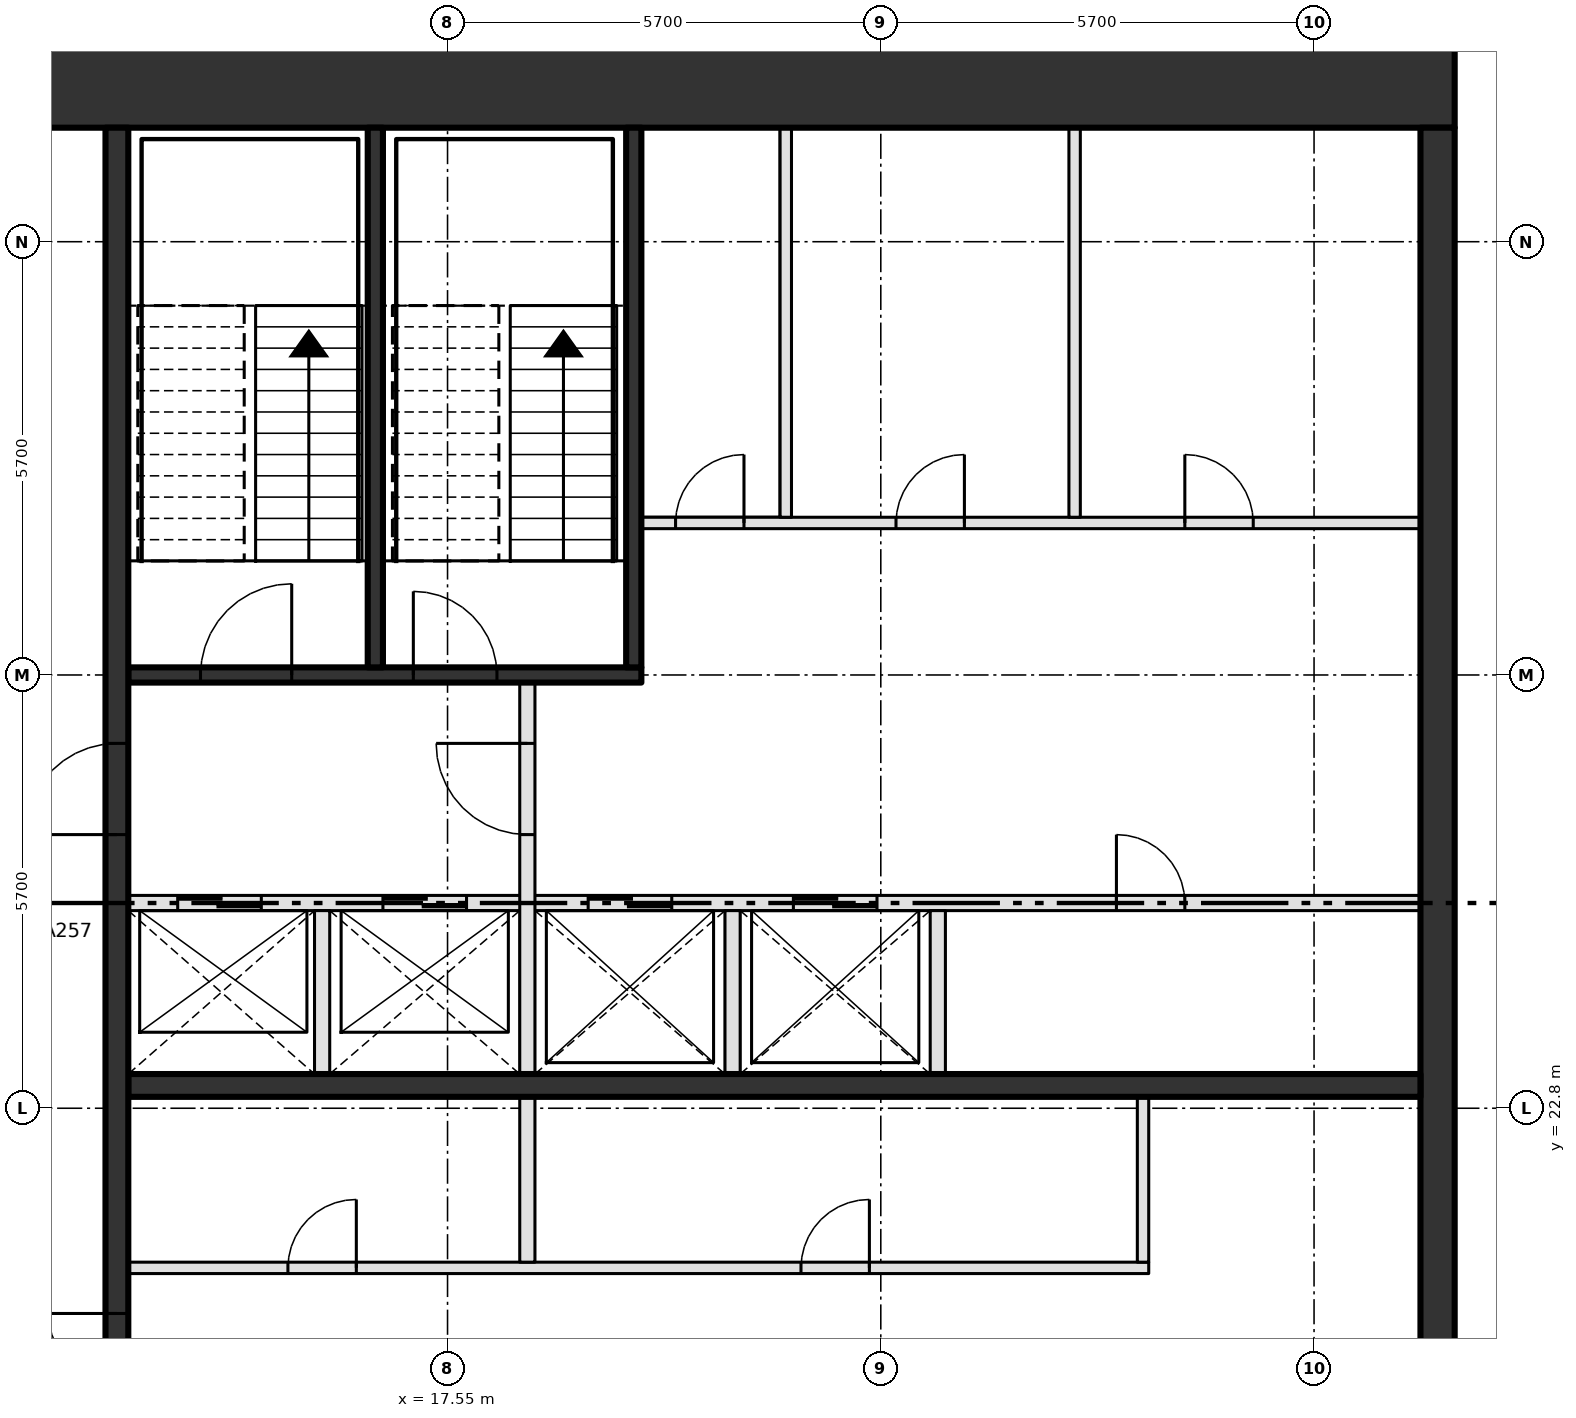
"""IFC4 building model, lengths in metres.
Left out: names, types, materials, properties, quantities, classifications, styles, units other than length and angle.
Written with IfcOpenShell. Run it as: python <this file> out.ifc"""

import sys

from ifc_helpers import new_model, si_unit, direction, frame, frame_2d, origin, place, context, subcontext, project, spatial, rectangle, extrude, element, fill, save


model = new_model("IFC4")
c1 = context("Model", 3, precision=1e-05, world=origin(), true_north=direction((0.0, 1.0)))
c2 = subcontext(c1, "Body", "Model", "MODEL_VIEW")
j1 = project(units=[si_unit("LENGTHUNIT", "METRE"), si_unit("PLANEANGLEUNIT", "RADIAN")], contexts=[c1])
p1 = place(None, origin())
s1 = spatial("IfcSite", under=j1, at=p1, CompositionType="ELEMENT")
p2 = place(p1, origin())
s2 = spatial("IfcBuilding", under=s1, at=p2, CompositionType="ELEMENT")
p3 = place(p2, frame((0.0, 0.0, 414.6)))
s3 = spatial("IfcBuildingStorey", under=s2, at=p3, CompositionType="ELEMENT", Elevation=414.6)
p4 = place(p3, frame((8.0, 36.3, -0.3), z_axis=(0.0, 0.0, 1.0), x_axis=(1.0, 0.0, 0.0)))
e1 = element("IfcWall", 1, at=p4, inside=s3, PredefinedType="SHEAR", context=c2, shape_type="SweptSolid", body=[
    extrude(rectangle(XDim=22.8, YDim=1.2, at=frame_2d((11.4, 0.0))), origin(), (0.0, 0.0, 1.0), 4.65),
])
p5 = place(p4, frame((2.3, 0.0, 0.3)))
e2 = element("IfcOpeningElement", 2, at=p5, cuts=e1, PredefinedType="OPENING", context=c2, shape_type="SweptSolid", body=[
    extrude(rectangle(XDim=1.8, YDim=2.1, at=frame_2d((0.9, 1.05))), frame((0.0, 0.61, 0.0), z_axis=(0.0, -1.0, 0.0), x_axis=(1.0, 0.0, 0.0)), (0.0, 0.0, 1.0), 1.22),
])
p6 = place(p3, frame((30.575, 14.55, -0.3), z_axis=(0.0, 0.0, 1.0), x_axis=(0.0, 1.0, 0.0)))
e3 = element("IfcWall", 3, at=p6, inside=s3, PredefinedType="SHEAR", context=c2, shape_type="SweptSolid", body=[
    extrude(rectangle(XDim=21.15, YDim=0.45, at=frame_2d((10.575, 0.0))), origin(), (0.0, 0.0, 1.0), 4.65),
])
p7 = place(p3, frame((13.35, 20.7, 0.0), z_axis=(0.0, 0.0, 1.0), x_axis=(1.0, 0.0, 0.0)))
e4 = element("IfcWall", 4, at=p7, inside=s3, PredefinedType="PARTITIONING", context=c2, shape_type="SweptSolid", body=[
    extrude(rectangle(XDim=13.425, YDim=0.15, at=frame_2d((6.712, 0.0))), origin(), (0.0, 0.0, 1.0), 4.35),
])
p8 = place(p7, frame((2.1, 0.0, 0.0)))
e5 = element("IfcOpeningElement", 5, at=p8, cuts=e4, PredefinedType="OPENING", context=c2, shape_type="SweptSolid", body=[
    extrude(rectangle(XDim=0.9, YDim=2.1, at=frame_2d((0.45, 1.05))), frame((0.0, 0.085, 0.0), z_axis=(0.0, -1.0, 0.0), x_axis=(1.0, 0.0, 0.0)), (0.0, 0.0, 1.0), 0.17),
])
p9 = place(p7, frame((8.85, 0.0, 0.0)))
e6 = element("IfcOpeningElement", 6, at=p9, cuts=e4, PredefinedType="OPENING", context=c2, shape_type="SweptSolid", body=[
    extrude(rectangle(XDim=0.9, YDim=2.1, at=frame_2d((0.45, 1.05))), frame((0.0, 0.085, 0.0), z_axis=(0.0, -1.0, 0.0), x_axis=(1.0, 0.0, 0.0)), (0.0, 0.0, 1.0), 0.17),
])
p10 = place(p3, frame((13.35, 23.1, 0.0), z_axis=(0.0, 0.0, 1.0), x_axis=(1.0, 0.0, 0.0)))
e7 = element("IfcWall", 7, at=p10, inside=s3, PredefinedType="SHEAR", context=c2, shape_type="SweptSolid", body=[
    extrude(rectangle(XDim=17.0, YDim=0.3, at=frame_2d((8.5, 0.0))), origin(), (0.0, 0.0, 1.0), 4.35),
])
p11 = place(p3, frame((13.35, 25.5, 0.0), z_axis=(0.0, 0.0, 1.0), x_axis=(1.0, 0.0, 0.0)))
e8 = element("IfcWall", 8, at=p11, inside=s3, PredefinedType="SOLIDWALL", context=c2, shape_type="SweptSolid", body=[
    extrude(rectangle(XDim=17.0, YDim=0.2, at=frame_2d((8.5, 0.0))), origin(), (0.0, 0.0, 1.0), 4.35),
])
p12 = place(p11, frame((0.65, 0.0, 0.0)))
e9 = element("IfcOpeningElement", 9, at=p12, cuts=e8, PredefinedType="OPENING", context=c2, shape_type="SweptSolid", body=[
    extrude(rectangle(XDim=1.1, YDim=2.1, at=frame_2d((0.55, 1.05))), frame((0.0, 0.11, 0.0), z_axis=(0.0, -1.0, 0.0), x_axis=(1.0, 0.0, 0.0)), (0.0, 0.0, 1.0), 0.22),
])
p13 = place(p11, frame((3.35, 0.0, 0.0)))
e10 = element("IfcOpeningElement", 10, at=p13, cuts=e8, PredefinedType="OPENING", context=c2, shape_type="SweptSolid", body=[
    extrude(rectangle(XDim=1.1, YDim=2.1, at=frame_2d((0.55, 1.05))), frame((0.0, 0.11, 0.0), z_axis=(0.0, -1.0, 0.0), x_axis=(1.0, 0.0, 0.0)), (0.0, 0.0, 1.0), 0.22),
])
p14 = place(p11, frame((6.05, 0.0, 0.0)))
e11 = element("IfcOpeningElement", 11, at=p14, cuts=e8, PredefinedType="OPENING", context=c2, shape_type="SweptSolid", body=[
    extrude(rectangle(XDim=1.1, YDim=2.1, at=frame_2d((0.55, 1.05))), frame((0.0, 0.11, 0.0), z_axis=(0.0, -1.0, 0.0), x_axis=(1.0, 0.0, 0.0)), (0.0, 0.0, 1.0), 0.22),
])
p15 = place(p11, frame((8.75, 0.0, 0.0)))
e12 = element("IfcOpeningElement", 12, at=p15, cuts=e8, PredefinedType="OPENING", context=c2, shape_type="SweptSolid", body=[
    extrude(rectangle(XDim=1.1, YDim=2.1, at=frame_2d((0.55, 1.05))), frame((0.0, 0.11, 0.0), z_axis=(0.0, -1.0, 0.0), x_axis=(1.0, 0.0, 0.0)), (0.0, 0.0, 1.0), 0.22),
])
p16 = place(p11, frame((13.0, 0.0, 0.0)))
e13 = element("IfcOpeningElement", 13, at=p16, cuts=e8, PredefinedType="OPENING", context=c2, shape_type="SweptSolid", body=[
    extrude(rectangle(XDim=0.9, YDim=2.1, at=frame_2d((0.45, 1.05))), frame((0.0, 0.11, 0.0), z_axis=(0.0, -1.0, 0.0), x_axis=(1.0, 0.0, 0.0)), (0.0, 0.0, 1.0), 0.22),
])
p17 = place(p3, frame((13.35, 28.5, 0.0), z_axis=(0.0, 0.0, 1.0), x_axis=(1.0, 0.0, 0.0)))
e14 = element("IfcWall", 14, at=p17, inside=s3, PredefinedType="SOLIDWALL", context=c2, shape_type="SweptSolid", body=[
    extrude(rectangle(XDim=6.75, YDim=0.2, at=frame_2d((3.375, 0.0))), origin(), (0.0, 0.0, 1.0), 4.35),
])
p18 = place(p17, frame((0.95, 0.0, 0.0)))
e15 = element("IfcOpeningElement", 15, at=p18, cuts=e14, PredefinedType="OPENING", context=c2, shape_type="SweptSolid", body=[
    extrude(rectangle(XDim=1.2, YDim=2.1, at=frame_2d((0.6, 1.05))), frame((0.0, 0.11, 0.0), z_axis=(0.0, -1.0, 0.0), x_axis=(1.0, 0.0, 0.0)), (0.0, 0.0, 1.0), 0.22),
])
p19 = place(p17, frame((3.75, 0.0, 0.0)))
e16 = element("IfcOpeningElement", 16, at=p19, cuts=e14, PredefinedType="OPENING", context=c2, shape_type="SweptSolid", body=[
    extrude(rectangle(XDim=1.1, YDim=2.1, at=frame_2d((0.55, 1.05))), frame((0.0, 0.11, 0.0), z_axis=(0.0, -1.0, 0.0), x_axis=(1.0, 0.0, 0.0)), (0.0, 0.0, 1.0), 0.22),
])
p20 = place(p3, frame((20.1, 30.5, 0.0), z_axis=(0.0, 0.0, 1.0), x_axis=(1.0, 0.0, 0.0)))
e17 = element("IfcWall", 17, at=p20, inside=s3, PredefinedType="PARTITIONING", context=c2, shape_type="SweptSolid", body=[
    extrude(rectangle(XDim=10.25, YDim=0.15, at=frame_2d((5.125, 0.0))), origin(), (0.0, 0.0, 1.0), 4.35),
])
p21 = place(p20, frame((0.45, 0.0, 0.0)))
e18 = element("IfcOpeningElement", 18, at=p21, cuts=e17, PredefinedType="OPENING", context=c2, shape_type="SweptSolid", body=[
    extrude(rectangle(XDim=0.9, YDim=2.1, at=frame_2d((0.45, 1.05))), frame((0.0, 0.085, 0.0), z_axis=(0.0, -1.0, 0.0), x_axis=(1.0, 0.0, 0.0)), (0.0, 0.0, 1.0), 0.17),
])
p22 = place(p20, frame((3.35, 0.0, 0.0)))
e19 = element("IfcOpeningElement", 19, at=p22, cuts=e17, PredefinedType="OPENING", context=c2, shape_type="SweptSolid", body=[
    extrude(rectangle(XDim=0.9, YDim=2.1, at=frame_2d((0.45, 1.05))), frame((0.0, 0.085, 0.0), z_axis=(0.0, -1.0, 0.0), x_axis=(1.0, 0.0, 0.0)), (0.0, 0.0, 1.0), 0.17),
])
p23 = place(p20, frame((7.15, 0.0, 0.0)))
e20 = element("IfcOpeningElement", 20, at=p23, cuts=e17, PredefinedType="OPENING", context=c2, shape_type="SweptSolid", body=[
    extrude(rectangle(XDim=0.9, YDim=2.1, at=frame_2d((0.45, 1.05))), frame((0.0, 0.085, 0.0), z_axis=(0.0, -1.0, 0.0), x_axis=(1.0, 0.0, 0.0)), (0.0, 0.0, 1.0), 0.17),
])
p24 = place(p3, frame((13.2, 14.55, 0.0), z_axis=(0.0, 0.0, 1.0), x_axis=(0.0, 1.0, 0.0)))
e21 = element("IfcWall", 21, at=p24, inside=s3, PredefinedType="SHEAR", context=c2, shape_type="SweptSolid", body=[
    extrude(rectangle(XDim=21.15, YDim=0.3, at=frame_2d((10.575, 0.0))), origin(), (0.0, 0.0, 1.0), 4.35),
])
p25 = place(p24, frame((3.75, 0.0, 0.0)))
e22 = element("IfcOpeningElement", 22, at=p25, cuts=e21, PredefinedType="OPENING", context=c2, shape_type="SweptSolid", body=[
    extrude(rectangle(XDim=1.8, YDim=2.1, at=frame_2d((0.9, 1.05))), frame((0.0, 0.16, 0.0), z_axis=(0.0, -1.0, 0.0), x_axis=(1.0, 0.0, 0.0)), (0.0, 0.0, 1.0), 0.32),
])
p26 = place(p24, frame((11.85, 0.0, 0.0)))
e23 = element("IfcOpeningElement", 23, at=p26, cuts=e21, PredefinedType="OPENING", context=c2, shape_type="SweptSolid", body=[
    extrude(rectangle(XDim=1.2, YDim=2.1, at=frame_2d((0.6, 1.05))), frame((0.0, 0.16, 0.0), z_axis=(0.0, -1.0, 0.0), x_axis=(1.0, 0.0, 0.0)), (0.0, 0.0, 1.0), 0.32),
])
p27 = place(p3, frame((15.9, 23.25, 0.0), z_axis=(0.0, 0.0, 1.0), x_axis=(0.0, 1.0, 0.0)))
e24 = element("IfcWall", 24, at=p27, inside=s3, PredefinedType="SOLIDWALL", context=c2, shape_type="SweptSolid", body=[
    extrude(rectangle(XDim=2.15, YDim=0.2, at=frame_2d((1.075, 0.0))), origin(), (0.0, 0.0, 1.0), 4.35),
])
p28 = place(p3, frame((16.6, 28.6, 0.0), z_axis=(0.0, 0.0, 1.0), x_axis=(0.0, 1.0, 0.0)))
e25 = element("IfcWall", 25, at=p28, inside=s3, PredefinedType="SOLIDWALL", context=c2, shape_type="SweptSolid", body=[
    extrude(rectangle(XDim=7.1, YDim=0.2, at=frame_2d((3.55, 0.0))), origin(), (0.0, 0.0, 1.0), 4.35),
])
p29 = place(p3, frame((18.6, 20.775, 0.0), z_axis=(0.0, 0.0, 1.0), x_axis=(0.0, 1.0, 0.0)))
e26 = element("IfcWall", 26, at=p29, inside=s3, PredefinedType="SOLIDWALL", context=c2, shape_type="SweptSolid", body=[
    extrude(rectangle(XDim=7.625, YDim=0.2, at=frame_2d((3.812, 0.0))), origin(), (0.0, 0.0, 1.0), 4.35),
])
p30 = place(p29, frame((5.625, 0.0, 0.0)))
e27 = element("IfcOpeningElement", 27, at=p30, cuts=e26, PredefinedType="OPENING", context=c2, shape_type="SweptSolid", body=[
    extrude(rectangle(XDim=1.2, YDim=2.1, at=frame_2d((0.6, 1.05))), frame((0.0, 0.11, 0.0), z_axis=(0.0, -1.0, 0.0), x_axis=(1.0, 0.0, 0.0)), (0.0, 0.0, 1.0), 0.22),
])
p31 = place(p3, frame((20.0, 28.6, 0.0), z_axis=(0.0, 0.0, 1.0), x_axis=(0.0, 1.0, 0.0)))
e28 = element("IfcWall", 28, at=p31, inside=s3, PredefinedType="SOLIDWALL", context=c2, shape_type="SweptSolid", body=[
    extrude(rectangle(XDim=7.1, YDim=0.2, at=frame_2d((3.55, 0.0))), origin(), (0.0, 0.0, 1.0), 4.35),
])
p32 = place(p3, frame((21.3, 23.25, 0.0), z_axis=(0.0, 0.0, 1.0), x_axis=(0.0, 1.0, 0.0)))
e29 = element("IfcWall", 29, at=p32, inside=s3, PredefinedType="SOLIDWALL", context=c2, shape_type="SweptSolid", body=[
    extrude(rectangle(XDim=2.15, YDim=0.2, at=frame_2d((1.075, 0.0))), origin(), (0.0, 0.0, 1.0), 4.35),
])
p33 = place(p3, frame((22.0, 30.575, 0.0), z_axis=(0.0, 0.0, 1.0), x_axis=(0.0, 1.0, 0.0)))
e30 = element("IfcWall", 30, at=p33, inside=s3, PredefinedType="PARTITIONING", context=c2, shape_type="SweptSolid", body=[
    extrude(rectangle(XDim=5.125, YDim=0.15, at=frame_2d((2.562, 0.0))), origin(), (0.0, 0.0, 1.0), 4.35),
])
p34 = place(p3, frame((24.0, 23.25, 0.0), z_axis=(0.0, 0.0, 1.0), x_axis=(0.0, 1.0, 0.0)))
e31 = element("IfcWall", 31, at=p34, inside=s3, PredefinedType="SOLIDWALL", context=c2, shape_type="SweptSolid", body=[
    extrude(rectangle(XDim=2.15, YDim=0.2, at=frame_2d((1.075, 0.0))), origin(), (0.0, 0.0, 1.0), 4.35),
])
p35 = place(p3, frame((25.8, 30.575, 0.0), z_axis=(0.0, 0.0, 1.0), x_axis=(0.0, 1.0, 0.0)))
e32 = element("IfcWall", 32, at=p35, inside=s3, PredefinedType="PARTITIONING", context=c2, shape_type="SweptSolid", body=[
    extrude(rectangle(XDim=5.125, YDim=0.15, at=frame_2d((2.562, 0.0))), origin(), (0.0, 0.0, 1.0), 4.35),
])
p36 = place(p3, frame((26.7, 20.775, 0.0), z_axis=(0.0, 0.0, 1.0), x_axis=(0.0, 1.0, 0.0)))
e33 = element("IfcWall", 33, at=p36, inside=s3, PredefinedType="PARTITIONING", context=c2, shape_type="SweptSolid", body=[
    extrude(rectangle(XDim=2.175, YDim=0.15, at=frame_2d((1.087, 0.0))), origin(), (0.0, 0.0, 1.0), 4.35),
])
p37 = place(p12, origin())
e34 = element("IfcDoor", 34, at=p37, inside=s3, OperationType="SLIDING_TO_LEFT", PredefinedType="DOOR", context=c2, shape_type="SweptSolid", body=[
    extrude(rectangle(XDim=1.1, YDim=2.1, at=frame_2d((0.55, 1.05))), frame((0.0, 0.025, 0.0), z_axis=(0.0, -1.0, 0.0), x_axis=(1.0, 0.0, 0.0)), (0.0, 0.0, 1.0), 0.05),
])
fill(e9, e34)
p38 = place(p13, origin())
e35 = element("IfcDoor", 35, at=p38, inside=s3, OperationType="SLIDING_TO_LEFT", PredefinedType="DOOR", context=c2, shape_type="SweptSolid", body=[
    extrude(rectangle(XDim=1.1, YDim=2.1, at=frame_2d((0.55, 1.05))), frame((0.0, 0.025, 0.0), z_axis=(0.0, -1.0, 0.0), x_axis=(1.0, 0.0, 0.0)), (0.0, 0.0, 1.0), 0.05),
])
fill(e10, e35)
p39 = place(p14, origin())
e36 = element("IfcDoor", 36, at=p39, inside=s3, OperationType="SLIDING_TO_LEFT", PredefinedType="DOOR", context=c2, shape_type="SweptSolid", body=[
    extrude(rectangle(XDim=1.1, YDim=2.1, at=frame_2d((0.55, 1.05))), frame((0.0, 0.025, 0.0), z_axis=(0.0, -1.0, 0.0), x_axis=(1.0, 0.0, 0.0)), (0.0, 0.0, 1.0), 0.05),
])
fill(e11, e36)
p40 = place(p15, origin())
e37 = element("IfcDoor", 37, at=p40, inside=s3, OperationType="SLIDING_TO_LEFT", PredefinedType="DOOR", context=c2, shape_type="SweptSolid", body=[
    extrude(rectangle(XDim=1.1, YDim=2.1, at=frame_2d((0.55, 1.05))), frame((0.0, 0.025, 0.0), z_axis=(0.0, -1.0, 0.0), x_axis=(1.0, 0.0, 0.0)), (0.0, 0.0, 1.0), 0.05),
])
fill(e12, e37)
p41 = place(p8, origin())
e38 = element("IfcDoor", 38, at=p41, inside=s3, OperationType="SINGLE_SWING_RIGHT", PredefinedType="DOOR", context=c2, shape_type="SweptSolid", body=[
    extrude(rectangle(XDim=0.9, YDim=2.1, at=frame_2d((0.45, 1.05))), frame((0.0, 0.025, 0.0), z_axis=(0.0, -1.0, 0.0), x_axis=(1.0, 0.0, 0.0)), (0.0, 0.0, 1.0), 0.05),
])
fill(e5, e38)
p42 = place(p9, origin())
e39 = element("IfcDoor", 39, at=p42, inside=s3, OperationType="SINGLE_SWING_RIGHT", PredefinedType="DOOR", context=c2, shape_type="SweptSolid", body=[
    extrude(rectangle(XDim=0.9, YDim=2.1, at=frame_2d((0.45, 1.05))), frame((0.0, 0.025, 0.0), z_axis=(0.0, -1.0, 0.0), x_axis=(1.0, 0.0, 0.0)), (0.0, 0.0, 1.0), 0.05),
])
fill(e6, e39)
p43 = place(p16, origin())
e40 = element("IfcDoor", 40, at=p43, inside=s3, OperationType="SINGLE_SWING_LEFT", PredefinedType="DOOR", context=c2, shape_type="SweptSolid", body=[
    extrude(rectangle(XDim=0.9, YDim=2.1, at=frame_2d((0.45, 1.05))), frame((0.0, 0.025, 0.0), z_axis=(0.0, -1.0, 0.0), x_axis=(1.0, 0.0, 0.0)), (0.0, 0.0, 1.0), 0.05),
])
fill(e13, e40)
p44 = place(p21, origin())
e41 = element("IfcDoor", 41, at=p44, inside=s3, OperationType="SINGLE_SWING_RIGHT", PredefinedType="DOOR", context=c2, shape_type="SweptSolid", body=[
    extrude(rectangle(XDim=0.9, YDim=2.1, at=frame_2d((0.45, 1.05))), frame((0.0, 0.025, 0.0), z_axis=(0.0, -1.0, 0.0), x_axis=(1.0, 0.0, 0.0)), (0.0, 0.0, 1.0), 0.05),
])
fill(e18, e41)
p45 = place(p22, origin())
e42 = element("IfcDoor", 42, at=p45, inside=s3, OperationType="SINGLE_SWING_RIGHT", PredefinedType="DOOR", context=c2, shape_type="SweptSolid", body=[
    extrude(rectangle(XDim=0.9, YDim=2.1, at=frame_2d((0.45, 1.05))), frame((0.0, 0.025, 0.0), z_axis=(0.0, -1.0, 0.0), x_axis=(1.0, 0.0, 0.0)), (0.0, 0.0, 1.0), 0.05),
])
fill(e19, e42)
p46 = place(p23, origin())
e43 = element("IfcDoor", 43, at=p46, inside=s3, OperationType="SINGLE_SWING_LEFT", PredefinedType="DOOR", context=c2, shape_type="SweptSolid", body=[
    extrude(rectangle(XDim=0.9, YDim=2.1, at=frame_2d((0.45, 1.05))), frame((0.0, 0.025, 0.0), z_axis=(0.0, -1.0, 0.0), x_axis=(1.0, 0.0, 0.0)), (0.0, 0.0, 1.0), 0.05),
])
fill(e20, e43)
p47 = place(p18, origin())
e44 = element("IfcDoor", 44, at=p47, inside=s3, OperationType="SINGLE_SWING_RIGHT", PredefinedType="DOOR", context=c2, shape_type="SweptSolid", body=[
    extrude(rectangle(XDim=1.2, YDim=2.1, at=frame_2d((0.6, 1.05))), frame((0.0, 0.025, 0.0), z_axis=(0.0, -1.0, 0.0), x_axis=(1.0, 0.0, 0.0)), (0.0, 0.0, 1.0), 0.05),
])
fill(e15, e44)
p48 = place(p19, origin())
e45 = element("IfcDoor", 45, at=p48, inside=s3, OperationType="SINGLE_SWING_LEFT", PredefinedType="DOOR", context=c2, shape_type="SweptSolid", body=[
    extrude(rectangle(XDim=1.1, YDim=2.1, at=frame_2d((0.55, 1.05))), frame((0.0, 0.025, 0.0), z_axis=(0.0, -1.0, 0.0), x_axis=(1.0, 0.0, 0.0)), (0.0, 0.0, 1.0), 0.05),
])
fill(e16, e45)
p49 = place(p25, origin())
e46 = element("IfcDoor", 46, at=p49, inside=s3, OperationType="DOUBLE_DOOR_SINGLE_SWING", PredefinedType="DOOR", context=c2, shape_type="SweptSolid", body=[
    extrude(rectangle(XDim=1.8, YDim=2.1, at=frame_2d((0.9, 1.05))), frame((0.0, 0.025, 0.0), z_axis=(0.0, -1.0, 0.0), x_axis=(1.0, 0.0, 0.0)), (0.0, 0.0, 1.0), 0.05),
])
fill(e22, e46)
p50 = place(p26, origin())
e47 = element("IfcDoor", 47, at=p50, inside=s3, OperationType="SINGLE_SWING_LEFT", PredefinedType="DOOR", context=c2, shape_type="SweptSolid", body=[
    extrude(rectangle(XDim=1.2, YDim=2.1, at=frame_2d((0.6, 1.05))), frame((0.0, 0.025, 0.0), z_axis=(0.0, -1.0, 0.0), x_axis=(1.0, 0.0, 0.0)), (0.0, 0.0, 1.0), 0.05),
])
fill(e23, e47)
p51 = place(p30, origin())
e48 = element("IfcDoor", 48, at=p51, inside=s3, OperationType="SINGLE_SWING_RIGHT", PredefinedType="DOOR", context=c2, shape_type="SweptSolid", body=[
    extrude(rectangle(XDim=1.2, YDim=2.1, at=frame_2d((0.6, 1.05))), frame((0.0, 0.025, 0.0), z_axis=(0.0, -1.0, 0.0), x_axis=(1.0, 0.0, 0.0)), (0.0, 0.0, 1.0), 0.05),
])
fill(e27, e48)
save(model, sys.argv[1])
